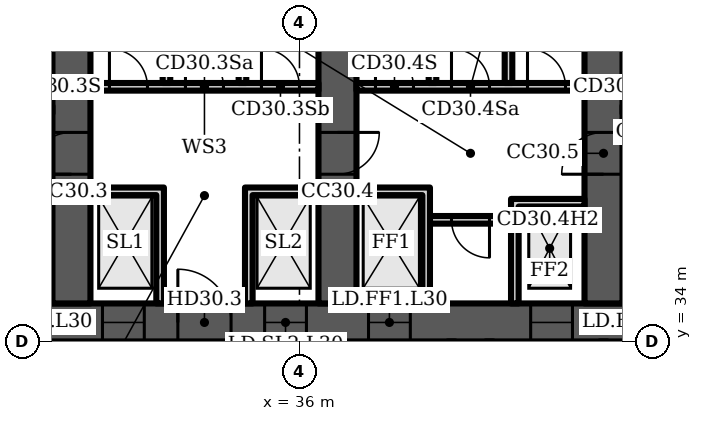
"""IFC4 building model, lengths in metres.
Left out: names, types, materials, properties, quantities, classifications, styles, units other than length and angle.
Written with IfcOpenShell. Run it as: python <this file> out.ifc"""

import sys

from ifc_helpers import new_model, si_unit, direction, frame, frame_2d, origin, place, context, subcontext, project, spatial, polyline, rectangle, outline, extrude, element, fill, save


model = new_model("IFC4")
c1 = context("Model", 3, precision=1e-05, world=origin(), true_north=direction((0.0, 1.0)))
c2 = subcontext(c1, "Body", "Model", "MODEL_VIEW")
j1 = project(units=[si_unit("LENGTHUNIT", "METRE"), si_unit("PLANEANGLEUNIT", "RADIAN")], contexts=[c1])
p1 = place(None, origin())
s1 = spatial("IfcSite", under=j1, at=p1, CompositionType="ELEMENT")
p2 = place(p1, origin())
s2 = spatial("IfcBuilding", under=s1, at=p2, CompositionType="ELEMENT")
p3 = place(p2, frame((0.0, 0.0, 129.1)))
s3 = spatial("IfcBuildingStorey", under=s2, at=p3, CompositionType="ELEMENT", Elevation=129.1)
p4 = place(p3, frame((16.0, 34.5, 0.0), z_axis=(0.0, 0.0, 1.0), x_axis=(1.0, 0.0, 0.0)))
e1 = element("IfcWall", 1, at=p4, inside=s3, PredefinedType="SHEAR", context=c2, shape_type="SweptSolid", body=[
    extrude(rectangle(XDim=49.0, YDim=1.0, at=frame_2d((24.5, 0.0))), origin(), (0.0, 0.0, 1.0), 3.6),
])
p5 = place(p4, frame((1.2, 0.0, 0.0)))
e2 = element("IfcOpeningElement", 2, at=p5, cuts=e1, PredefinedType="OPENING", context=c2, shape_type="SweptSolid", body=[
    extrude(rectangle(XDim=1.1, YDim=2.1, at=frame_2d((0.55, 1.05))), frame((0.0, 0.51, 0.0), z_axis=(0.0, -1.0, 0.0), x_axis=(1.0, 0.0, 0.0)), (0.0, 0.0, 1.0), 1.02),
])
p6 = place(p4, frame((5.083, 0.0, 0.0)))
e3 = element("IfcOpeningElement", 3, at=p6, cuts=e1, PredefinedType="OPENING", context=c2, shape_type="SweptSolid", body=[
    extrude(rectangle(XDim=1.1, YDim=2.1, at=frame_2d((0.55, 1.05))), frame((0.0, 0.51, 0.0), z_axis=(0.0, -1.0, 0.0), x_axis=(1.0, 0.0, 0.0)), (0.0, 0.0, 1.0), 1.02),
])
p7 = place(p4, frame((2.933, 0.0, 0.0)))
e4 = element("IfcOpeningElement", 4, at=p7, cuts=e1, PredefinedType="OPENING", context=c2, shape_type="SweptSolid", body=[
    extrude(rectangle(XDim=1.4, YDim=2.1, at=frame_2d((0.7, 1.05))), frame((0.0, 0.51, 0.0), z_axis=(0.0, -1.0, 0.0), x_axis=(1.0, 0.0, 0.0)), (0.0, 0.0, 1.0), 1.02),
])
p8 = place(p4, frame((7.65, 0.0, 0.0)))
e5 = element("IfcOpeningElement", 5, at=p8, cuts=e1, PredefinedType="OPENING", context=c2, shape_type="SweptSolid", body=[
    extrude(rectangle(XDim=1.2, YDim=2.1, at=frame_2d((0.6, 1.05))), frame((0.0, 0.51, 0.0), z_axis=(0.0, -1.0, 0.0), x_axis=(1.0, 0.0, 0.0)), (0.0, 0.0, 1.0), 1.02),
])
p9 = place(p4, frame((14.817, 0.0, 0.0)))
e6 = element("IfcOpeningElement", 6, at=p9, cuts=e1, PredefinedType="OPENING", context=c2, shape_type="SweptSolid", body=[
    extrude(rectangle(XDim=1.1, YDim=2.1, at=frame_2d((0.55, 1.05))), frame((0.0, 0.51, 0.0), z_axis=(0.0, -1.0, 0.0), x_axis=(1.0, 0.0, 0.0)), (0.0, 0.0, 1.0), 1.02),
])
p10 = place(p4, frame((19.083, 0.0, 0.0)))
e7 = element("IfcOpeningElement", 7, at=p10, cuts=e1, PredefinedType="OPENING", context=c2, shape_type="SweptSolid", body=[
    extrude(rectangle(XDim=1.1, YDim=2.1, at=frame_2d((0.55, 1.05))), frame((0.0, 0.51, 0.0), z_axis=(0.0, -1.0, 0.0), x_axis=(1.0, 0.0, 0.0)), (0.0, 0.0, 1.0), 1.02),
])
p11 = place(p4, frame((16.8, 0.0, 0.0)))
e8 = element("IfcOpeningElement", 8, at=p11, cuts=e1, PredefinedType="OPENING", context=c2, shape_type="SweptSolid", body=[
    extrude(rectangle(XDim=1.4, YDim=2.1, at=frame_2d((0.7, 1.05))), frame((0.0, 0.51, 0.0), z_axis=(0.0, -1.0, 0.0), x_axis=(1.0, 0.0, 0.0)), (0.0, 0.0, 1.0), 1.02),
])
p12 = place(p4, frame((21.817, 0.0, 0.0)))
e9 = element("IfcOpeningElement", 9, at=p12, cuts=e1, PredefinedType="OPENING", context=c2, shape_type="SweptSolid", body=[
    extrude(rectangle(XDim=1.1, YDim=2.1, at=frame_2d((0.55, 1.05))), frame((0.0, 0.51, 0.0), z_axis=(0.0, -1.0, 0.0), x_axis=(1.0, 0.0, 0.0)), (0.0, 0.0, 1.0), 1.02),
])
p13 = place(p4, frame((26.083, 0.0, 0.0)))
e10 = element("IfcOpeningElement", 10, at=p13, cuts=e1, PredefinedType="OPENING", context=c2, shape_type="SweptSolid", body=[
    extrude(rectangle(XDim=1.1, YDim=2.1, at=frame_2d((0.55, 1.05))), frame((0.0, 0.51, 0.0), z_axis=(0.0, -1.0, 0.0), x_axis=(1.0, 0.0, 0.0)), (0.0, 0.0, 1.0), 1.02),
])
p14 = place(p4, frame((33.15, 0.0, 0.0)))
e11 = element("IfcOpeningElement", 11, at=p14, cuts=e1, PredefinedType="OPENING", context=c2, shape_type="SweptSolid", body=[
    extrude(rectangle(XDim=1.2, YDim=2.1, at=frame_2d((0.6, 1.05))), frame((0.0, 0.51, 0.0), z_axis=(0.0, -1.0, 0.0), x_axis=(1.0, 0.0, 0.0)), (0.0, 0.0, 1.0), 1.02),
])
p15 = place(p4, frame((37.8, 0.0, 0.0)))
e12 = element("IfcOpeningElement", 12, at=p15, cuts=e1, PredefinedType="OPENING", context=c2, shape_type="SweptSolid", body=[
    extrude(rectangle(XDim=1.4, YDim=2.1, at=frame_2d((0.7, 1.05))), frame((0.0, 0.51, 0.0), z_axis=(0.0, -1.0, 0.0), x_axis=(1.0, 0.0, 0.0)), (0.0, 0.0, 1.0), 1.02),
])
p16 = place(p4, frame((42.817, 0.0, 0.0)))
e13 = element("IfcOpeningElement", 13, at=p16, cuts=e1, PredefinedType="OPENING", context=c2, shape_type="SweptSolid", body=[
    extrude(rectangle(XDim=1.1, YDim=2.1, at=frame_2d((0.55, 1.05))), frame((0.0, 0.51, 0.0), z_axis=(0.0, -1.0, 0.0), x_axis=(1.0, 0.0, 0.0)), (0.0, 0.0, 1.0), 1.02),
])
p17 = place(p4, frame((46.7, 0.0, 0.0)))
e14 = element("IfcOpeningElement", 14, at=p17, cuts=e1, PredefinedType="OPENING", context=c2, shape_type="SweptSolid", body=[
    extrude(rectangle(XDim=1.1, YDim=2.1, at=frame_2d((0.55, 1.05))), frame((0.0, 0.51, 0.0), z_axis=(0.0, -1.0, 0.0), x_axis=(1.0, 0.0, 0.0)), (0.0, 0.0, 1.0), 1.02),
])
p18 = place(p4, frame((44.667, 0.0, 0.0)))
e15 = element("IfcOpeningElement", 15, at=p18, cuts=e1, PredefinedType="OPENING", context=c2, shape_type="SweptSolid", body=[
    extrude(rectangle(XDim=1.4, YDim=2.1, at=frame_2d((0.7, 1.05))), frame((0.0, 0.51, 0.0), z_axis=(0.0, -1.0, 0.0), x_axis=(1.0, 0.0, 0.0)), (0.0, 0.0, 1.0), 1.02),
])
p19 = place(p3, frame((30.0, 35.0, 0.0), z_axis=(0.0, 0.0, 1.0), x_axis=(0.0, 1.0, 0.0)))
e16 = element("IfcWall", 16, at=p19, inside=s3, PredefinedType="SHEAR", context=c2, shape_type="SweptSolid", body=[
    extrude(rectangle(XDim=13.965, YDim=1.0, at=frame_2d((6.982, 0.0))), origin(), (0.0, 0.0, 1.0), 3.6),
])
p20 = place(p19, frame((3.4, 0.0, 0.0)))
e17 = element("IfcOpeningElement", 17, at=p20, cuts=e16, PredefinedType="OPENING", context=c2, shape_type="SweptSolid", body=[
    extrude(rectangle(XDim=1.1, YDim=2.1, at=frame_2d((0.55, 1.05))), frame((0.0, 0.51, 0.0), z_axis=(0.0, -1.0, 0.0), x_axis=(1.0, 0.0, 0.0)), (0.0, 0.0, 1.0), 1.02),
])
p21 = place(p3, frame((37.0, 35.0, 0.0), z_axis=(0.0, 0.0, 1.0), x_axis=(0.0, 1.0, 0.0)))
e18 = element("IfcWall", 18, at=p21, inside=s3, PredefinedType="SHEAR", context=c2, shape_type="SweptSolid", body=[
    extrude(rectangle(XDim=14.577, YDim=1.0, at=frame_2d((7.289, 0.0))), origin(), (0.0, 0.0, 1.0), 3.6),
])
p22 = place(p21, frame((3.4, 0.0, 0.0)))
e19 = element("IfcOpeningElement", 19, at=p22, cuts=e18, PredefinedType="OPENING", context=c2, shape_type="SweptSolid", body=[
    extrude(rectangle(XDim=1.1, YDim=2.1, at=frame_2d((0.55, 1.05))), frame((0.0, 0.51, 0.0), z_axis=(0.0, -1.0, 0.0), x_axis=(1.0, 0.0, 0.0)), (0.0, 0.0, 1.0), 1.02),
])
p23 = place(p21, frame((9.8, 0.0, 0.0)))
e20 = element("IfcOpeningElement", 20, at=p23, cuts=e18, PredefinedType="OPENING", context=c2, shape_type="SweptSolid", body=[
    extrude(rectangle(XDim=1.0, YDim=2.1, at=frame_2d((0.5, 1.05))), frame((0.0, 0.51, 0.0), z_axis=(0.0, -1.0, 0.0), x_axis=(1.0, 0.0, 0.0)), (0.0, 0.0, 1.0), 1.02),
])
p24 = place(p3, frame((44.0, 35.0, 0.0), z_axis=(0.0, 0.0, 1.0), x_axis=(0.0, 1.0, 0.0)))
e21 = element("IfcWall", 21, at=p24, inside=s3, PredefinedType="SHEAR", context=c2, shape_type="SweptSolid", body=[
    extrude(rectangle(XDim=14.577, YDim=1.0, at=frame_2d((7.289, 0.0))), origin(), (0.0, 0.0, 1.0), 3.6),
])
p25 = place(p24, frame((3.4, 0.0, 0.0)))
e22 = element("IfcOpeningElement", 22, at=p25, cuts=e21, PredefinedType="OPENING", context=c2, shape_type="SweptSolid", body=[
    extrude(rectangle(XDim=1.1, YDim=2.1, at=frame_2d((0.55, 1.05))), frame((0.0, 0.51, 0.0), z_axis=(0.0, -1.0, 0.0), x_axis=(1.0, 0.0, 0.0)), (0.0, 0.0, 1.0), 1.02),
])
p26 = place(p24, frame((9.8, 0.0, 0.0)))
e23 = element("IfcOpeningElement", 23, at=p26, cuts=e21, PredefinedType="OPENING", context=c2, shape_type="SweptSolid", body=[
    extrude(rectangle(XDim=1.0, YDim=2.1, at=frame_2d((0.5, 1.05))), frame((0.0, 0.51, 0.0), z_axis=(0.0, -1.0, 0.0), x_axis=(1.0, 0.0, 0.0)), (0.0, 0.0, 1.0), 1.02),
])
p27 = place(p3, frame((30.5, 40.7, 0.0), z_axis=(0.0, 0.0, 1.0), x_axis=(1.0, 0.0, 0.0)))
e24 = element("IfcWall", 24, at=p27, inside=s3, PredefinedType="PARTITIONING", context=c2, shape_type="SweptSolid", body=[
    extrude(rectangle(XDim=6.0, YDim=0.2, at=frame_2d((3.0, 0.0))), origin(), (0.0, 0.0, 1.0), 3.2),
])
p28 = place(p27, frame((0.5, 0.0, 0.0)))
e25 = element("IfcOpeningElement", 25, at=p28, cuts=e24, PredefinedType="OPENING", context=c2, shape_type="SweptSolid", body=[
    extrude(rectangle(XDim=1.0, YDim=2.1, at=frame_2d((0.5, 1.05))), frame((0.0, 0.11, 0.0), z_axis=(0.0, -1.0, 0.0), x_axis=(1.0, 0.0, 0.0)), (0.0, 0.0, 1.0), 0.22),
])
p29 = place(p27, frame((2.5, 0.0, 0.0)))
e26 = element("IfcOpeningElement", 26, at=p29, cuts=e24, PredefinedType="OPENING", context=c2, shape_type="SweptSolid", body=[
    extrude(rectangle(XDim=1.0, YDim=2.1, at=frame_2d((0.5, 1.05))), frame((0.0, 0.11, 0.0), z_axis=(0.0, -1.0, 0.0), x_axis=(1.0, 0.0, 0.0)), (0.0, 0.0, 1.0), 0.22),
])
p30 = place(p27, frame((4.5, 0.0, 0.0)))
e27 = element("IfcOpeningElement", 27, at=p30, cuts=e24, PredefinedType="OPENING", context=c2, shape_type="SweptSolid", body=[
    extrude(rectangle(XDim=1.0, YDim=2.1, at=frame_2d((0.5, 1.05))), frame((0.0, 0.11, 0.0), z_axis=(0.0, -1.0, 0.0), x_axis=(1.0, 0.0, 0.0)), (0.0, 0.0, 1.0), 0.22),
])
p31 = place(p3, frame((0.0, 0.0, -0.0)))
e28 = element("IfcWall", 28, at=p31, inside=s3, PredefinedType="PARTITIONING", context=c2, shape_type="SweptSolid", body=[
    extrude(outline(polyline([(32.233, 37.85), (30.5, 37.85), (30.5, 38.05), (32.233, 38.05), (32.433, 38.05), (32.433, 35.0), (32.233, 35.0), (32.233, 37.85)])), origin(), (0.0, 0.0, 1.0), 3.2),
])
p32 = place(p3, frame((0.0, 0.0, -0.0)))
e29 = element("IfcWall", 29, at=p32, inside=s3, PredefinedType="PARTITIONING", context=c2, shape_type="SweptSolid", body=[
    extrude(outline(polyline([(34.567, 38.05), (34.767, 38.05), (36.5, 38.05), (36.5, 37.85), (34.767, 37.85), (34.767, 35.0), (34.567, 35.0), (34.567, 38.05)])), origin(), (0.0, 0.0, 1.0), 3.2),
])
for number, where, z_axis, x_axis in (
    (30, (32.5, 40.8, 0.0), (0.0, 0.0, 1.0), (0.0, 1.0, 0.0)),
    (31, (34.5, 40.8, 0.0), (0.0, 0.0, 1.0), (0.0, 1.0, 0.0)),
):
    element("IfcWall", number, at=place(p3, frame(where, z_axis=z_axis, x_axis=x_axis)), inside=s3, PredefinedType="PARTITIONING", context=c2, shape_type="SweptSolid", body=[
        extrude(rectangle(XDim=8.232, YDim=0.2, at=frame_2d((4.116, 0.0))), origin(), (0.0, 0.0, 1.0), 3.2),
    ])
p33 = place(p3, frame((39.433, 37.2, 0.0), z_axis=(0.0, 0.0, 1.0), x_axis=(1.0, 0.0, 0.0)))
e32 = element("IfcWall", 32, at=p33, inside=s3, PredefinedType="PARTITIONING", context=c2, shape_type="SweptSolid", body=[
    extrude(rectangle(XDim=2.133, YDim=0.2, at=frame_2d((1.067, 0.0))), origin(), (0.0, 0.0, 1.0), 3.2),
])
p34 = place(p33, frame((0.567, 0.0, 0.0)))
e33 = element("IfcOpeningElement", 33, at=p34, cuts=e32, PredefinedType="OPENING", context=c2, shape_type="SweptSolid", body=[
    extrude(rectangle(XDim=1.0, YDim=2.1, at=frame_2d((0.5, 1.05))), frame((0.0, 0.11, 0.0), z_axis=(0.0, -1.0, 0.0), x_axis=(1.0, 0.0, 0.0)), (0.0, 0.0, 1.0), 0.22),
])
p35 = place(p3, frame((37.5, 40.7, 0.0), z_axis=(0.0, 0.0, 1.0), x_axis=(1.0, 0.0, 0.0)))
e34 = element("IfcWall", 34, at=p35, inside=s3, PredefinedType="PARTITIONING", context=c2, shape_type="SweptSolid", body=[
    extrude(rectangle(XDim=6.0, YDim=0.2, at=frame_2d((3.0, 0.0))), origin(), (0.0, 0.0, 1.0), 3.2),
])
p36 = place(p35, frame((0.5, 0.0, 0.0)))
e35 = element("IfcOpeningElement", 35, at=p36, cuts=e34, PredefinedType="OPENING", context=c2, shape_type="SweptSolid", body=[
    extrude(rectangle(XDim=1.0, YDim=2.1, at=frame_2d((0.5, 1.05))), frame((0.0, 0.11, 0.0), z_axis=(0.0, -1.0, 0.0), x_axis=(1.0, 0.0, 0.0)), (0.0, 0.0, 1.0), 0.22),
])
p37 = place(p35, frame((2.5, 0.0, 0.0)))
e36 = element("IfcOpeningElement", 36, at=p37, cuts=e34, PredefinedType="OPENING", context=c2, shape_type="SweptSolid", body=[
    extrude(rectangle(XDim=1.0, YDim=2.1, at=frame_2d((0.5, 1.05))), frame((0.0, 0.11, 0.0), z_axis=(0.0, -1.0, 0.0), x_axis=(1.0, 0.0, 0.0)), (0.0, 0.0, 1.0), 0.22),
])
p38 = place(p35, frame((4.5, 0.0, 0.0)))
e37 = element("IfcOpeningElement", 37, at=p38, cuts=e34, PredefinedType="OPENING", context=c2, shape_type="SweptSolid", body=[
    extrude(rectangle(XDim=1.0, YDim=2.1, at=frame_2d((0.5, 1.05))), frame((0.0, 0.11, 0.0), z_axis=(0.0, -1.0, 0.0), x_axis=(1.0, 0.0, 0.0)), (0.0, 0.0, 1.0), 0.22),
])
p39 = place(p3, frame((0.0, 0.0, -0.0)))
e38 = element("IfcWall", 38, at=p39, inside=s3, PredefinedType="PARTITIONING", context=c2, shape_type="SweptSolid", body=[
    extrude(outline(polyline([(41.567, 37.75), (41.767, 37.75), (43.5, 37.75), (43.5, 37.55), (41.767, 37.55), (41.767, 35.0), (41.567, 35.0), (41.567, 37.75)])), origin(), (0.0, 0.0, 1.0), 3.2),
])
p40 = place(p3, frame((0.0, 0.0, -0.0)))
e39 = element("IfcWall", 39, at=p40, inside=s3, PredefinedType="PARTITIONING", context=c2, shape_type="SweptSolid", body=[
    extrude(outline(polyline([(39.233, 37.85), (37.5, 37.85), (37.5, 38.05), (39.233, 38.05), (39.433, 38.05), (39.433, 35.0), (39.233, 35.0), (39.233, 37.85)])), origin(), (0.0, 0.0, 1.0), 3.2),
])
for number, where, z_axis, x_axis in (
    (40, (39.5, 40.8, 0.0), (0.0, 0.0, 1.0), (0.0, 1.0, 0.0)),
    (41, (41.5, 40.8, 0.0), (0.0, 0.0, 1.0), (0.0, 1.0, 0.0)),
):
    element("IfcWall", number, at=place(p3, frame(where, z_axis=z_axis, x_axis=x_axis)), inside=s3, PredefinedType="PARTITIONING", context=c2, shape_type="SweptSolid", body=[
        extrude(rectangle(XDim=8.844, YDim=0.2, at=frame_2d((4.422, 0.0))), origin(), (0.0, 0.0, 1.0), 3.2),
    ])
p41 = place(p9, origin())
e42 = element("IfcDoor", 42, at=p41, inside=s3, OperationType="DOUBLE_DOOR_SLIDING", PredefinedType="DOOR", context=c2, shape_type="SweptSolid", body=[
    extrude(rectangle(XDim=1.1, YDim=2.1, at=frame_2d((0.55, 1.05))), frame((0.0, 0.025, 0.0), z_axis=(0.0, -1.0, 0.0), x_axis=(1.0, 0.0, 0.0)), (0.0, 0.0, 1.0), 0.05),
])
fill(e6, e42)
p42 = place(p10, origin())
e43 = element("IfcDoor", 43, at=p42, inside=s3, OperationType="DOUBLE_DOOR_SLIDING", PredefinedType="DOOR", context=c2, shape_type="SweptSolid", body=[
    extrude(rectangle(XDim=1.1, YDim=2.1, at=frame_2d((0.55, 1.05))), frame((0.0, 0.025, 0.0), z_axis=(0.0, -1.0, 0.0), x_axis=(1.0, 0.0, 0.0)), (0.0, 0.0, 1.0), 0.05),
])
fill(e7, e43)
p43 = place(p11, origin())
e44 = element("IfcDoor", 44, at=p43, inside=s3, OperationType="DOUBLE_DOOR_SINGLE_SWING", PredefinedType="DOOR", context=c2, shape_type="SweptSolid", body=[
    extrude(rectangle(XDim=1.4, YDim=2.1, at=frame_2d((0.7, 1.05))), frame((0.0, 0.025, 0.0), z_axis=(0.0, -1.0, 0.0), x_axis=(1.0, 0.0, 0.0)), (0.0, 0.0, 1.0), 0.05),
])
fill(e8, e44)
p44 = place(p28, origin())
e45 = element("IfcDoor", 45, at=p44, inside=s3, OperationType="SINGLE_SWING_LEFT", PredefinedType="DOOR", context=c2, shape_type="SweptSolid", body=[
    extrude(rectangle(XDim=1.0, YDim=2.1, at=frame_2d((0.5, 1.05))), frame((0.0, 0.025, 0.0), z_axis=(0.0, -1.0, 0.0), x_axis=(1.0, 0.0, 0.0)), (0.0, 0.0, 1.0), 0.05),
])
fill(e25, e45)
p45 = place(p29, origin())
e46 = element("IfcDoor", 46, at=p45, inside=s3, OperationType="SINGLE_SWING_LEFT", PredefinedType="DOOR", context=c2, shape_type="SweptSolid", body=[
    extrude(rectangle(XDim=1.0, YDim=2.1, at=frame_2d((0.5, 1.05))), frame((0.0, 0.025, 0.0), z_axis=(0.0, -1.0, 0.0), x_axis=(1.0, 0.0, 0.0)), (0.0, 0.0, 1.0), 0.05),
])
fill(e26, e46)
p46 = place(p30, origin())
e47 = element("IfcDoor", 47, at=p46, inside=s3, OperationType="SINGLE_SWING_LEFT", PredefinedType="DOOR", context=c2, shape_type="SweptSolid", body=[
    extrude(rectangle(XDim=1.0, YDim=2.1, at=frame_2d((0.5, 1.05))), frame((0.0, 0.025, 0.0), z_axis=(0.0, -1.0, 0.0), x_axis=(1.0, 0.0, 0.0)), (0.0, 0.0, 1.0), 0.05),
])
fill(e27, e47)
p47 = place(p34, origin())
e48 = element("IfcDoor", 48, at=p47, inside=s3, OperationType="SINGLE_SWING_RIGHT", PredefinedType="DOOR", context=c2, shape_type="SweptSolid", body=[
    extrude(rectangle(XDim=1.0, YDim=2.1, at=frame_2d((0.5, 1.05))), frame((0.0, 0.025, 0.0), z_axis=(0.0, -1.0, 0.0), x_axis=(1.0, 0.0, 0.0)), (0.0, 0.0, 1.0), 0.05),
])
fill(e33, e48)
p48 = place(p12, origin())
e49 = element("IfcDoor", 49, at=p48, inside=s3, OperationType="DOUBLE_DOOR_SLIDING", PredefinedType="DOOR", context=c2, shape_type="SweptSolid", body=[
    extrude(rectangle(XDim=1.1, YDim=2.1, at=frame_2d((0.55, 1.05))), frame((0.0, 0.025, 0.0), z_axis=(0.0, -1.0, 0.0), x_axis=(1.0, 0.0, 0.0)), (0.0, 0.0, 1.0), 0.05),
])
fill(e9, e49)
p49 = place(p13, origin())
e50 = element("IfcDoor", 50, at=p49, inside=s3, OperationType="DOUBLE_DOOR_SLIDING", PredefinedType="DOOR", context=c2, shape_type="SweptSolid", body=[
    extrude(rectangle(XDim=1.1, YDim=2.1, at=frame_2d((0.55, 1.05))), frame((0.0, 0.025, 0.0), z_axis=(0.0, -1.0, 0.0), x_axis=(1.0, 0.0, 0.0)), (0.0, 0.0, 1.0), 0.05),
])
fill(e10, e50)
p50 = place(p36, origin())
e51 = element("IfcDoor", 51, at=p50, inside=s3, OperationType="SINGLE_SWING_LEFT", PredefinedType="DOOR", context=c2, shape_type="SweptSolid", body=[
    extrude(rectangle(XDim=1.0, YDim=2.1, at=frame_2d((0.5, 1.05))), frame((0.0, 0.025, 0.0), z_axis=(0.0, -1.0, 0.0), x_axis=(1.0, 0.0, 0.0)), (0.0, 0.0, 1.0), 0.05),
])
fill(e35, e51)
p51 = place(p37, origin())
e52 = element("IfcDoor", 52, at=p51, inside=s3, OperationType="SINGLE_SWING_LEFT", PredefinedType="DOOR", context=c2, shape_type="SweptSolid", body=[
    extrude(rectangle(XDim=1.0, YDim=2.1, at=frame_2d((0.5, 1.05))), frame((0.0, 0.025, 0.0), z_axis=(0.0, -1.0, 0.0), x_axis=(1.0, 0.0, 0.0)), (0.0, 0.0, 1.0), 0.05),
])
fill(e36, e52)
p52 = place(p38, origin())
e53 = element("IfcDoor", 53, at=p52, inside=s3, OperationType="SINGLE_SWING_LEFT", PredefinedType="DOOR", context=c2, shape_type="SweptSolid", body=[
    extrude(rectangle(XDim=1.0, YDim=2.1, at=frame_2d((0.5, 1.05))), frame((0.0, 0.025, 0.0), z_axis=(0.0, -1.0, 0.0), x_axis=(1.0, 0.0, 0.0)), (0.0, 0.0, 1.0), 0.05),
])
fill(e37, e53)
p53 = place(p20, origin())
e54 = element("IfcDoor", 54, at=p53, inside=s3, OperationType="SINGLE_SWING_LEFT", PredefinedType="DOOR", context=c2, shape_type="SweptSolid", body=[
    extrude(rectangle(XDim=1.1, YDim=2.1, at=frame_2d((0.55, 1.05))), frame((0.0, 0.025, 0.0), z_axis=(0.0, -1.0, 0.0), x_axis=(1.0, 0.0, 0.0)), (0.0, 0.0, 1.0), 0.05),
])
fill(e17, e54)
p54 = place(p22, origin())
e55 = element("IfcDoor", 55, at=p54, inside=s3, OperationType="SINGLE_SWING_RIGHT", PredefinedType="DOOR", context=c2, shape_type="SweptSolid", body=[
    extrude(rectangle(XDim=1.1, YDim=2.1, at=frame_2d((0.55, 1.05))), frame((0.0, 0.025, 0.0), z_axis=(0.0, -1.0, 0.0), x_axis=(1.0, 0.0, 0.0)), (0.0, 0.0, 1.0), 0.05),
])
fill(e19, e55)
p55 = place(p25, origin())
e56 = element("IfcDoor", 56, at=p55, inside=s3, OperationType="SINGLE_SWING_LEFT", PredefinedType="DOOR", context=c2, shape_type="SweptSolid", body=[
    extrude(rectangle(XDim=1.1, YDim=2.1, at=frame_2d((0.55, 1.05))), frame((0.0, 0.025, 0.0), z_axis=(0.0, -1.0, 0.0), x_axis=(1.0, 0.0, 0.0)), (0.0, 0.0, 1.0), 0.05),
])
fill(e22, e56)
save(model, sys.argv[1])
